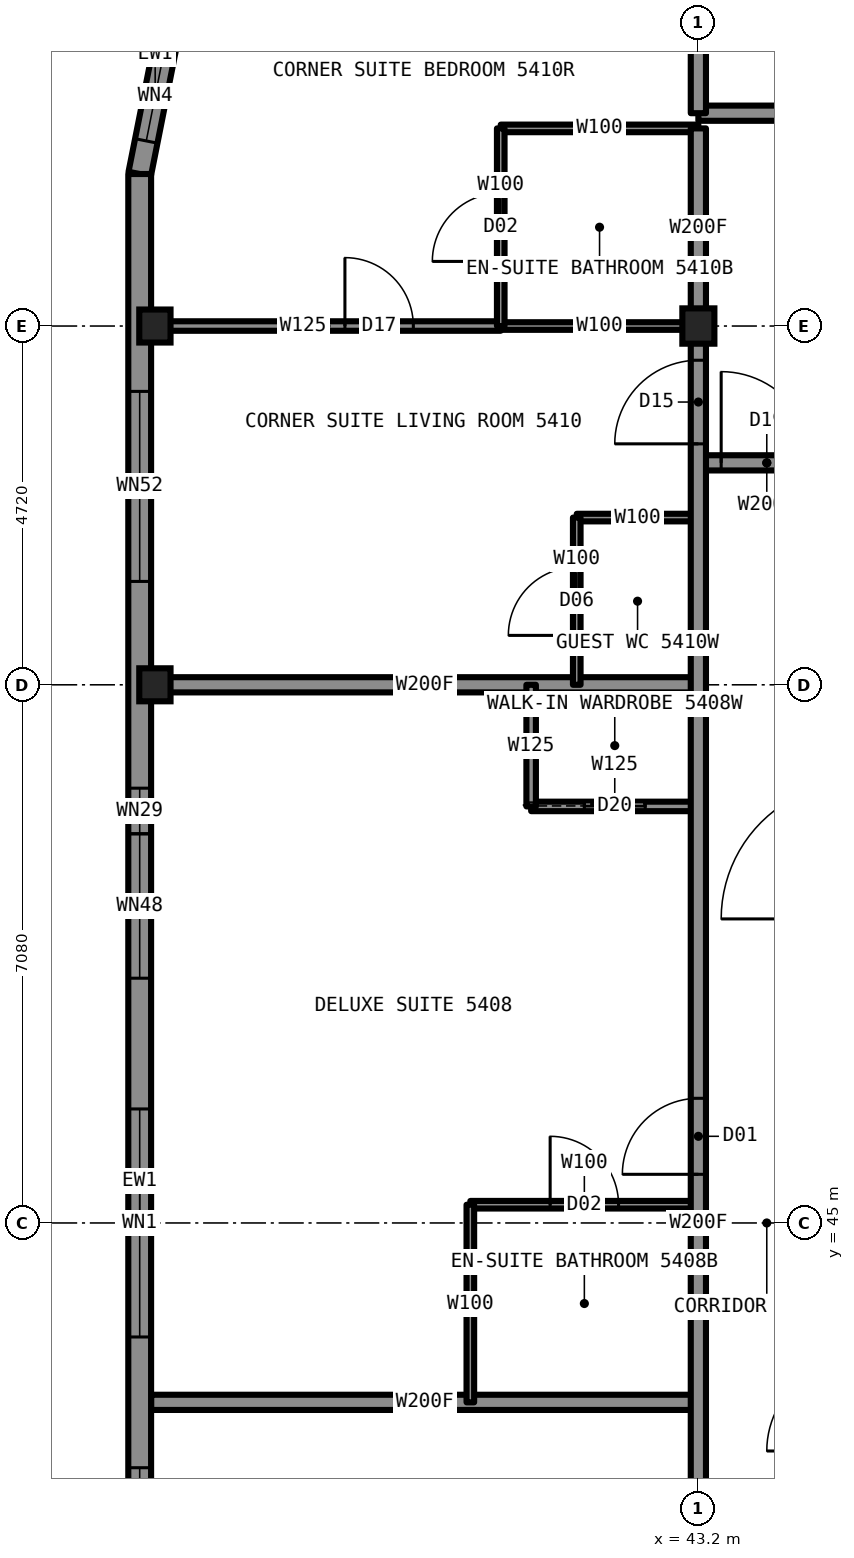
"""IFC4 building model, lengths in metres.
Left out: names, types, materials, properties, quantities, classifications, styles, units other than length and angle.
Written with IfcOpenShell. Run it as: python <this file> out.ifc"""

import sys

from ifc_helpers import new_model, si_unit, direction, frame, frame_2d, origin, origin_2d, place, context, subcontext, project, spatial, rectangle, i_section, extrude, element, fill, save


model = new_model("IFC4")
c1 = context("Model", 3, precision=1e-05, world=origin(), true_north=direction((0.0, 1.0)))
c2 = subcontext(c1, "Body", "Model", "MODEL_VIEW")
j1 = project(units=[si_unit("LENGTHUNIT", "METRE"), si_unit("PLANEANGLEUNIT", "RADIAN")], contexts=[c1])
p1 = place(None, origin())
s1 = spatial("IfcSite", under=j1, at=p1, CompositionType="ELEMENT")
p2 = place(p1, origin())
s2 = spatial("IfcBuilding", under=s1, at=p2, CompositionType="ELEMENT")
p3 = place(p2, frame((0.0, 0.0, 193.3)))
s3 = spatial("IfcBuildingStorey", under=s2, at=p3, CompositionType="ELEMENT", Elevation=193.3)
for number, where, z_axis, x_axis in (
    (1, (36.05, 52.08, 0.0), (0.0, 0.0, 1.0), (1.0, 0.0, 0.0)),
    (2, (36.05, 56.8, 0.0), (0.0, 0.0, 1.0), (1.0, 0.0, 0.0)),
):
    element("IfcColumn", number, at=place(p3, frame(where, z_axis=z_axis, x_axis=x_axis)), inside=s3, PredefinedType="COLUMN", context=c2, shape_type="SweptSolid", body=[
        extrude(i_section(OverallWidth=0.411, OverallDepth=0.434, WebThickness=0.036, FlangeThickness=0.057, at=origin_2d()), origin(), (0.0, 0.0, 1.0), 3.5),
    ])
p4 = place(p3, frame((43.2, 56.8, 0.0), z_axis=(0.0, 0.0, 1.0), x_axis=(1.0, 0.0, 0.0)))
e3 = element("IfcColumn", 3, at=p4, inside=s3, PredefinedType="COLUMN", context=c2, shape_type="SweptSolid", body=[
    extrude(i_section(OverallWidth=0.422, OverallDepth=0.465, WebThickness=0.045, FlangeThickness=0.073, at=origin_2d()), origin(), (0.0, 0.0, 1.0), 3.5),
])
p5 = place(p3, frame((36.0, 42.64, 0.0), z_axis=(0.0, 0.0, 1.0), x_axis=(1.0, 0.0, 0.0)))
e4 = element("IfcWall", 4, at=p5, inside=s3, PredefinedType="PARTITIONING", context=c2, shape_type="SweptSolid", body=[
    extrude(rectangle(XDim=7.2, YDim=0.2, at=frame_2d((3.6, 0.0))), origin(), (0.0, 0.0, 1.0), 2.73),
])
p6 = place(p3, frame((40.2, 45.24, 0.0), z_axis=(0.0, 0.0, 1.0), x_axis=(1.0, 0.0, 0.0)))
e5 = element("IfcWall", 5, at=p6, inside=s3, PredefinedType="PARTITIONING", context=c2, shape_type="SweptSolid", body=[
    extrude(rectangle(XDim=3.0, YDim=0.1, at=frame_2d((1.5, 0.0))), origin(), (0.0, 0.0, 1.0), 3.33),
])
p7 = place(p6, frame((1.05, 0.0, 0.0)))
e6 = element("IfcOpeningElement", 6, at=p7, cuts=e5, PredefinedType="OPENING", context=c2, shape_type="SweptSolid", body=[
    extrude(rectangle(XDim=0.9, YDim=2.1, at=frame_2d((0.45, 1.05))), frame((0.0, 0.06, 0.0), z_axis=(0.0, -1.0, 0.0), x_axis=(1.0, 0.0, 0.0)), (0.0, 0.0, 1.0), 0.12),
])
p8 = place(p3, frame((43.2, 55.0, 0.0), z_axis=(0.0, 0.0, 1.0), x_axis=(1.0, 0.0, 0.0)))
e7 = element("IfcWall", 7, at=p8, inside=s3, PredefinedType="PARTITIONING", context=c2, shape_type="SweptSolid", body=[
    extrude(rectangle(XDim=1.8, YDim=0.2, at=frame_2d((0.9, 0.0))), origin(), (0.0, 0.0, 1.0), 3.33),
])
p9 = place(p8, frame((0.3, 0.0, 0.0)))
e8 = element("IfcOpeningElement", 8, at=p9, cuts=e7, PredefinedType="OPENING", context=c2, shape_type="SweptSolid", body=[
    extrude(rectangle(XDim=1.2, YDim=2.2, at=frame_2d((0.6, 1.1))), frame((0.0, 0.11, 0.0), z_axis=(0.0, -1.0, 0.0), x_axis=(1.0, 0.0, 0.0)), (0.0, 0.0, 1.0), 0.22),
])
p10 = place(p3, frame((40.6, 56.8, 0.0), z_axis=(0.0, 0.0, 1.0), x_axis=(1.0, 0.0, 0.0)))
e9 = element("IfcWall", 9, at=p10, inside=s3, PredefinedType="PARTITIONING", context=c2, shape_type="SweptSolid", body=[
    extrude(rectangle(XDim=2.6, YDim=0.1, at=frame_2d((1.3, 0.0))), origin(), (0.0, 0.0, 1.0), 2.573),
])
p11 = place(p3, frame((36.0, 56.8, 0.0), z_axis=(0.0, 0.0, 1.0), x_axis=(1.0, 0.0, 0.0)))
e10 = element("IfcWall", 10, at=p11, inside=s3, PredefinedType="PARTITIONING", context=c2, shape_type="SweptSolid", body=[
    extrude(rectangle(XDim=4.6, YDim=0.125, at=frame_2d((2.3, 0.0))), origin(), (0.0, 0.0, 1.0), 2.573),
])
p12 = place(p11, frame((2.55, 0.0, 0.0)))
e11 = element("IfcOpeningElement", 11, at=p12, cuts=e10, PredefinedType="OPENING", context=c2, shape_type="SweptSolid", body=[
    extrude(rectangle(XDim=0.9, YDim=2.2, at=frame_2d((0.45, 1.1))), frame((0.0, 0.073, 0.0), z_axis=(0.0, -1.0, 0.0), x_axis=(1.0, 0.0, 0.0)), (0.0, 0.0, 1.0), 0.145),
])
p13 = place(p3, frame((40.6, 59.4, 0.0), z_axis=(0.0, 0.0, 1.0), x_axis=(1.0, 0.0, 0.0)))
e12 = element("IfcWall", 12, at=p13, inside=s3, PredefinedType="PARTITIONING", context=c2, shape_type="SweptSolid", body=[
    extrude(rectangle(XDim=2.6, YDim=0.1, at=frame_2d((1.3, 0.0))), origin(), (0.0, 0.0, 1.0), 3.33),
])
p14 = place(p3, frame((43.2, 59.6, 0.0), z_axis=(0.0, 0.0, 1.0), x_axis=(1.0, 0.0, 0.0)))
e13 = element("IfcWall", 13, at=p14, inside=s3, PredefinedType="PARTITIONING", context=c2, shape_type="SweptSolid", body=[
    extrude(rectangle(XDim=23.6, YDim=0.2, at=frame_2d((11.8, 0.0))), origin(), (0.0, 0.0, 1.0), 3.33),
])
p15 = place(p14, frame((3.0, 0.0, 0.0)))
e14 = element("IfcOpeningElement", 14, at=p15, cuts=e13, PredefinedType="OPENING", context=c2, shape_type="SweptSolid", body=[
    extrude(rectangle(XDim=1.0, YDim=2.2, at=frame_2d((0.5, 1.1))), frame((0.0, 0.11, 0.0), z_axis=(0.0, -1.0, 0.0), x_axis=(1.0, 0.0, 0.0)), (0.0, 0.0, 1.0), 0.22),
])
p16 = place(p14, frame((11.29, 0.0, 0.0)))
e15 = element("IfcOpeningElement", 15, at=p16, cuts=e13, PredefinedType="OPENING", context=c2, shape_type="SweptSolid", body=[
    extrude(rectangle(XDim=1.1, YDim=2.2, at=frame_2d((0.55, 1.1))), frame((0.0, 0.11, 0.0), z_axis=(0.0, -1.0, 0.0), x_axis=(1.0, 0.0, 0.0)), (0.0, 0.0, 1.0), 0.22),
])
p17 = place(p3, frame((41.0, 50.48, 0.0), z_axis=(0.0, 0.0, 1.0), x_axis=(1.0, 0.0, 0.0)))
e16 = element("IfcWall", 16, at=p17, inside=s3, PredefinedType="PARTITIONING", context=c2, shape_type="SweptSolid", body=[
    extrude(rectangle(XDim=2.2, YDim=0.125, at=frame_2d((1.1, 0.0))), origin(), (0.0, 0.0, 1.0), 3.33),
])
p18 = place(p17, frame((0.7, 0.0, 0.0)))
e17 = element("IfcOpeningElement", 17, at=p18, cuts=e16, PredefinedType="OPENING", context=c2, shape_type="SweptSolid", body=[
    extrude(rectangle(XDim=0.8, YDim=2.1, at=frame_2d((0.4, 1.05))), frame((0.0, 0.073, 0.0), z_axis=(0.0, -1.0, 0.0), x_axis=(1.0, 0.0, 0.0)), (0.0, 0.0, 1.0), 0.145),
])
p19 = place(p3, frame((36.0, 52.08, 0.0), z_axis=(0.0, 0.0, 1.0), x_axis=(1.0, 0.0, 0.0)))
e18 = element("IfcWall", 18, at=p19, inside=s3, PredefinedType="PARTITIONING", context=c2, shape_type="SweptSolid", body=[
    extrude(rectangle(XDim=7.2, YDim=0.2, at=frame_2d((3.6, 0.0))), origin(), (0.0, 0.0, 1.0), 2.573),
])
p20 = place(p3, frame((41.6, 54.28, 0.0), z_axis=(0.0, 0.0, 1.0), x_axis=(1.0, 0.0, 0.0)))
e19 = element("IfcWall", 19, at=p20, inside=s3, PredefinedType="PARTITIONING", context=c2, shape_type="SweptSolid", body=[
    extrude(rectangle(XDim=1.6, YDim=0.1, at=frame_2d((0.8, 0.0))), origin(), (0.0, 0.0, 1.0), 3.33),
])
p21 = place(p3, frame((43.2, 33.22, 0.0), z_axis=(0.0, 0.0, 1.0), x_axis=(0.0, 1.0, 0.0)))
e20 = element("IfcWall", 20, at=p21, inside=s3, PredefinedType="PARTITIONING", context=c2, shape_type="SweptSolid", body=[
    extrude(rectangle(XDim=23.56, YDim=0.2, at=frame_2d((11.78, 0.0))), origin(), (0.0, 0.0, 1.0), 3.33),
])
p22 = place(p21, frame((7.25, 0.0, 0.0)))
e21 = element("IfcOpeningElement", 21, at=p22, cuts=e20, PredefinedType="OPENING", context=c2, shape_type="SweptSolid", body=[
    extrude(rectangle(XDim=1.0, YDim=2.2, at=frame_2d((0.5, 1.1))), frame((0.0, 0.11, 0.0), z_axis=(0.0, -1.0, 0.0), x_axis=(1.0, 0.0, 0.0)), (0.0, 0.0, 1.0), 0.22),
])
p23 = place(p21, frame((12.42, 0.0, 0.0)))
e22 = element("IfcOpeningElement", 22, at=p23, cuts=e20, PredefinedType="OPENING", context=c2, shape_type="SweptSolid", body=[
    extrude(rectangle(XDim=1.0, YDim=2.2, at=frame_2d((0.5, 1.1))), frame((0.0, 0.11, 0.0), z_axis=(0.0, -1.0, 0.0), x_axis=(1.0, 0.0, 0.0)), (0.0, 0.0, 1.0), 0.22),
])
p24 = place(p21, frame((22.03, 0.0, 0.0)))
e23 = element("IfcOpeningElement", 23, at=p24, cuts=e20, PredefinedType="OPENING", context=c2, shape_type="SweptSolid", body=[
    extrude(rectangle(XDim=1.1, YDim=2.2, at=frame_2d((0.55, 1.1))), frame((0.0, 0.11, 0.0), z_axis=(0.0, -1.0, 0.0), x_axis=(1.0, 0.0, 0.0)), (0.0, 0.0, 1.0), 0.22),
])
p25 = place(p21, frame((0.63, 0.0, 0.0)))
e24 = element("IfcOpeningElement", 24, at=p25, cuts=e20, PredefinedType="OPENING", context=c2, shape_type="SweptSolid", body=[
    extrude(rectangle(XDim=1.1, YDim=2.2, at=frame_2d((0.55, 1.1))), frame((0.0, 0.11, 0.0), z_axis=(0.0, -1.0, 0.0), x_axis=(1.0, 0.0, 0.0)), (0.0, 0.0, 1.0), 0.22),
])
p26 = place(p3, frame((43.2, 59.6, 0.0), z_axis=(0.0, 0.0, 1.0), x_axis=(0.0, 1.0, 0.0)))
e25 = element("IfcWall", 25, at=p26, inside=s3, PredefinedType="PARTITIONING", context=c2, shape_type="SweptSolid", body=[
    extrude(rectangle(XDim=4.4, YDim=0.2, at=frame_2d((2.2, 0.0))), origin(), (0.0, 0.0, 1.0), 2.573),
])
p27 = place(p3, frame((41.6, 52.08, 0.0), z_axis=(0.0, 0.0, 1.0), x_axis=(0.0, 1.0, 0.0)))
e26 = element("IfcWall", 26, at=p27, inside=s3, PredefinedType="PARTITIONING", context=c2, shape_type="SweptSolid", body=[
    extrude(rectangle(XDim=2.2, YDim=0.1, at=frame_2d((1.1, 0.0))), origin(), (0.0, 0.0, 1.0), 3.33),
])
p28 = place(p27, frame((0.65, 0.0, 0.0)))
e27 = element("IfcOpeningElement", 27, at=p28, cuts=e26, PredefinedType="OPENING", context=c2, shape_type="SweptSolid", body=[
    extrude(rectangle(XDim=0.9, YDim=2.1, at=frame_2d((0.45, 1.05))), frame((0.0, 0.06, 0.0), z_axis=(0.0, -1.0, 0.0), x_axis=(1.0, 0.0, 0.0)), (0.0, 0.0, 1.0), 0.12),
])
p29 = place(p3, frame((41.0, 50.48, 0.0), z_axis=(0.0, 0.0, 1.0), x_axis=(0.0, 1.0, 0.0)))
e28 = element("IfcWall", 28, at=p29, inside=s3, PredefinedType="PARTITIONING", context=c2, shape_type="SweptSolid", body=[
    extrude(rectangle(XDim=1.6, YDim=0.125, at=frame_2d((0.8, 0.0))), origin(), (0.0, 0.0, 1.0), 3.33),
])
p30 = place(p3, frame((40.6, 56.8, 0.0), z_axis=(0.0, 0.0, 1.0), x_axis=(0.0, 1.0, 0.0)))
e29 = element("IfcWall", 29, at=p30, inside=s3, PredefinedType="PARTITIONING", context=c2, shape_type="SweptSolid", body=[
    extrude(rectangle(XDim=2.6, YDim=0.1, at=frame_2d((1.3, 0.0))), origin(), (0.0, 0.0, 1.0), 3.33),
])
p31 = place(p30, frame((0.85, 0.0, 0.0)))
e30 = element("IfcOpeningElement", 30, at=p31, cuts=e29, PredefinedType="OPENING", context=c2, shape_type="SweptSolid", body=[
    extrude(rectangle(XDim=0.9, YDim=2.1, at=frame_2d((0.45, 1.05))), frame((0.0, 0.06, 0.0), z_axis=(0.0, -1.0, 0.0), x_axis=(1.0, 0.0, 0.0)), (0.0, 0.0, 1.0), 0.12),
])
p32 = place(p3, frame((40.2, 42.64, 0.0), z_axis=(0.0, 0.0, 1.0), x_axis=(0.0, 1.0, 0.0)))
e31 = element("IfcWall", 31, at=p32, inside=s3, PredefinedType="PARTITIONING", context=c2, shape_type="SweptSolid", body=[
    extrude(rectangle(XDim=2.6, YDim=0.1, at=frame_2d((1.3, 0.0))), origin(), (0.0, 0.0, 1.0), 3.33),
])
p33 = place(p3, frame((36.257, 60.847, 0.0), z_axis=(0.0, 0.0, 1.0), x_axis=(-0.195081421501, -0.980787050784, 0.0)))
e32 = element("IfcWall", 32, at=p33, inside=s3, PredefinedType="SOLIDWALL", context=c2, shape_type="SweptSolid", body=[
    extrude(rectangle(XDim=2.087, YDim=0.3, at=frame_2d((1.044, 0.0))), origin(), (0.0, 0.0, 1.0), 3.33),
])
p34 = place(p33, frame((0.444, 0.0, 0.3)))
e33 = element("IfcOpeningElement", 33, at=p34, cuts=e32, PredefinedType="OPENING", context=c2, shape_type="SweptSolid", body=[
    extrude(rectangle(XDim=1.2, YDim=2.0, at=frame_2d((0.6, 1.0))), frame((0.0, 0.16, 0.0), z_axis=(0.0, -1.0, 0.0), x_axis=(1.0, 0.0, 0.0)), (0.0, 0.0, 1.0), 0.32),
])
p35 = place(p3, frame((35.85, 58.8, 0.0), z_axis=(0.0, 0.0, 1.0), x_axis=(0.0, -1.0, 0.0)))
e34 = element("IfcWall", 34, at=p35, inside=s3, PredefinedType="SOLIDWALL", context=c2, shape_type="SweptSolid", body=[
    extrude(rectangle(XDim=27.6, YDim=0.3, at=frame_2d((13.8, 0.0))), origin(), (0.0, 0.0, 1.0), 2.83),
])
p36 = place(p35, frame((2.86, 0.0, 0.3)))
e35 = element("IfcOpeningElement", 35, at=p36, cuts=e34, PredefinedType="OPENING", context=c2, shape_type="SweptSolid", body=[
    extrude(rectangle(XDim=3.0, YDim=2.0, at=frame_2d((1.5, 1.0))), frame((0.0, 0.16, 0.0), z_axis=(0.0, -1.0, 0.0), x_axis=(1.0, 0.0, 0.0)), (0.0, 0.0, 1.0), 0.32),
])
p37 = place(p35, frame((7.58, 0.0, 0.3)))
e36 = element("IfcOpeningElement", 36, at=p37, cuts=e34, PredefinedType="OPENING", context=c2, shape_type="SweptSolid", body=[
    extrude(rectangle(XDim=2.5, YDim=2.0, at=frame_2d((1.25, 1.0))), frame((0.0, 0.16, 0.0), z_axis=(0.0, -1.0, 0.0), x_axis=(1.0, 0.0, 0.0)), (0.0, 0.0, 1.0), 0.32),
])
p38 = place(p35, frame((12.95, 0.0, 1.0)))
e37 = element("IfcOpeningElement", 37, at=p38, cuts=e34, PredefinedType="OPENING", context=c2, shape_type="SweptSolid", body=[
    extrude(rectangle(XDim=1.7, YDim=1.3, at=frame_2d((0.85, 0.65))), frame((0.0, 0.16, 0.0), z_axis=(0.0, -1.0, 0.0), x_axis=(1.0, 0.0, 0.0)), (0.0, 0.0, 1.0), 0.32),
])
p39 = place(p35, frame((17.52, 0.0, 0.3)))
e38 = element("IfcOpeningElement", 38, at=p39, cuts=e34, PredefinedType="OPENING", context=c2, shape_type="SweptSolid", body=[
    extrude(rectangle(XDim=2.5, YDim=2.0, at=frame_2d((1.25, 1.0))), frame((0.0, 0.16, 0.0), z_axis=(0.0, -1.0, 0.0), x_axis=(1.0, 0.0, 0.0)), (0.0, 0.0, 1.0), 0.32),
])
p40 = place(p35, frame((21.74, 0.0, 0.3)))
e39 = element("IfcOpeningElement", 39, at=p40, cuts=e34, PredefinedType="OPENING", context=c2, shape_type="SweptSolid", body=[
    extrude(rectangle(XDim=3.0, YDim=2.0, at=frame_2d((1.5, 1.0))), frame((0.0, 0.16, 0.0), z_axis=(0.0, -1.0, 0.0), x_axis=(1.0, 0.0, 0.0)), (0.0, 0.0, 1.0), 0.32),
])
p41 = place(p3, frame((43.2, 56.78, 0.0), z_axis=(0.0, 0.0, 1.0), x_axis=(0.0, 1.0, 0.0)))
e40 = element("IfcWall", 40, at=p41, inside=s3, PredefinedType="PARTITIONING", context=c2, shape_type="SweptSolid", body=[
    extrude(rectangle(XDim=2.62, YDim=0.2, at=frame_2d((1.31, 0.0))), origin(), (0.0, 0.0, 1.0), 2.573),
])
p42 = place(p9, origin())
e41 = element("IfcDoor", 41, at=p42, inside=s3, OperationType="SINGLE_SWING_LEFT", PredefinedType="DOOR", context=c2, shape_type="SweptSolid", body=[
    extrude(rectangle(XDim=1.2, YDim=2.2, at=frame_2d((0.6, 1.1))), frame((0.0, 0.025, 0.0), z_axis=(0.0, -1.0, 0.0), x_axis=(1.0, 0.0, 0.0)), (0.0, 0.0, 1.0), 0.05),
])
fill(e8, e41)
p43 = place(p23, origin())
e42 = element("IfcDoor", 42, at=p43, inside=s3, OperationType="SINGLE_SWING_LEFT", PredefinedType="DOOR", context=c2, shape_type="SweptSolid", body=[
    extrude(rectangle(XDim=1.0, YDim=2.2, at=frame_2d((0.5, 1.1))), frame((0.0, 0.025, 0.0), z_axis=(0.0, -1.0, 0.0), x_axis=(1.0, 0.0, 0.0)), (0.0, 0.0, 1.0), 0.05),
])
fill(e22, e42)
p44 = place(p7, origin())
e43 = element("IfcDoor", 43, at=p44, inside=s3, OperationType="SINGLE_SWING_RIGHT", PredefinedType="DOOR", context=c2, shape_type="SweptSolid", body=[
    extrude(rectangle(XDim=0.9, YDim=2.1, at=frame_2d((0.45, 1.05))), frame((0.0, 0.025, 0.0), z_axis=(0.0, -1.0, 0.0), x_axis=(1.0, 0.0, 0.0)), (0.0, 0.0, 1.0), 0.05),
])
fill(e6, e43)
p45 = place(p18, origin())
e44 = element("IfcDoor", 44, at=p45, inside=s3, OperationType="SLIDING_TO_LEFT", PredefinedType="DOOR", context=c2, shape_type="SweptSolid", body=[
    extrude(rectangle(XDim=0.8, YDim=2.1, at=frame_2d((0.4, 1.05))), frame((0.0, 0.025, 0.0), z_axis=(0.0, -1.0, 0.0), x_axis=(1.0, 0.0, 0.0)), (0.0, 0.0, 1.0), 0.05),
])
fill(e17, e44)
p46 = place(p24, origin())
e45 = element("IfcDoor", 45, at=p46, inside=s3, OperationType="SINGLE_SWING_LEFT", PredefinedType="DOOR", context=c2, shape_type="SweptSolid", body=[
    extrude(rectangle(XDim=1.1, YDim=2.2, at=frame_2d((0.55, 1.1))), frame((0.0, 0.025, 0.0), z_axis=(0.0, -1.0, 0.0), x_axis=(1.0, 0.0, 0.0)), (0.0, 0.0, 1.0), 0.05),
])
fill(e23, e45)
p47 = place(p31, origin())
e46 = element("IfcDoor", 46, at=p47, inside=s3, OperationType="SINGLE_SWING_RIGHT", PredefinedType="DOOR", context=c2, shape_type="SweptSolid", body=[
    extrude(rectangle(XDim=0.9, YDim=2.1, at=frame_2d((0.45, 1.05))), frame((0.0, 0.025, 0.0), z_axis=(0.0, -1.0, 0.0), x_axis=(1.0, 0.0, 0.0)), (0.0, 0.0, 1.0), 0.05),
])
fill(e30, e46)
p48 = place(p12, origin())
e47 = element("IfcDoor", 47, at=p48, inside=s3, OperationType="SINGLE_SWING_LEFT", PredefinedType="DOOR", context=c2, shape_type="SweptSolid", body=[
    extrude(rectangle(XDim=0.9, YDim=2.2, at=frame_2d((0.45, 1.1))), frame((0.0, 0.025, 0.0), z_axis=(0.0, -1.0, 0.0), x_axis=(1.0, 0.0, 0.0)), (0.0, 0.0, 1.0), 0.05),
])
fill(e11, e47)
p49 = place(p28, origin())
e48 = element("IfcDoor", 48, at=p49, inside=s3, OperationType="SINGLE_SWING_LEFT", PredefinedType="DOOR", context=c2, shape_type="SweptSolid", body=[
    extrude(rectangle(XDim=0.9, YDim=2.1, at=frame_2d((0.45, 1.05))), frame((0.0, 0.025, 0.0), z_axis=(0.0, -1.0, 0.0), x_axis=(1.0, 0.0, 0.0)), (0.0, 0.0, 1.0), 0.05),
])
fill(e27, e48)
p50 = place(p34, origin())
e49 = element("IfcWindow", 49, at=p50, inside=s3, PartitioningType="SINGLE_PANEL", PredefinedType="WINDOW", context=c2, shape_type="SweptSolid", body=[
    extrude(rectangle(XDim=1.2, YDim=2.0, at=frame_2d((0.6, 1.0))), frame((0.0, 0.13, 0.0), z_axis=(0.0, -1.0, 0.0), x_axis=(1.0, 0.0, 0.0)), (0.0, 0.0, 1.0), 0.06),
])
fill(e33, e49)
p51 = place(p36, origin())
e50 = element("IfcWindow", 50, at=p51, inside=s3, PartitioningType="SINGLE_PANEL", PredefinedType="WINDOW", context=c2, shape_type="SweptSolid", body=[
    extrude(rectangle(XDim=3.0, YDim=2.0, at=frame_2d((1.5, 1.0))), frame((0.0, 0.13, 0.0), z_axis=(0.0, -1.0, 0.0), x_axis=(1.0, 0.0, 0.0)), (0.0, 0.0, 1.0), 0.06),
])
fill(e35, e50)
p52 = place(p37, origin())
e51 = element("IfcWindow", 51, at=p52, inside=s3, PartitioningType="SINGLE_PANEL", PredefinedType="WINDOW", context=c2, shape_type="SweptSolid", body=[
    extrude(rectangle(XDim=2.5, YDim=2.0, at=frame_2d((1.25, 1.0))), frame((0.0, 0.13, 0.0), z_axis=(0.0, -1.0, 0.0), x_axis=(1.0, 0.0, 0.0)), (0.0, 0.0, 1.0), 0.06),
])
fill(e36, e51)
p53 = place(p38, origin())
e52 = element("IfcWindow", 52, at=p53, inside=s3, PartitioningType="SINGLE_PANEL", PredefinedType="WINDOW", context=c2, shape_type="SweptSolid", body=[
    extrude(rectangle(XDim=1.7, YDim=1.3, at=frame_2d((0.85, 0.65))), frame((0.0, 0.13, 0.0), z_axis=(0.0, -1.0, 0.0), x_axis=(1.0, 0.0, 0.0)), (0.0, 0.0, 1.0), 0.06),
])
fill(e37, e52)
save(model, sys.argv[1])
